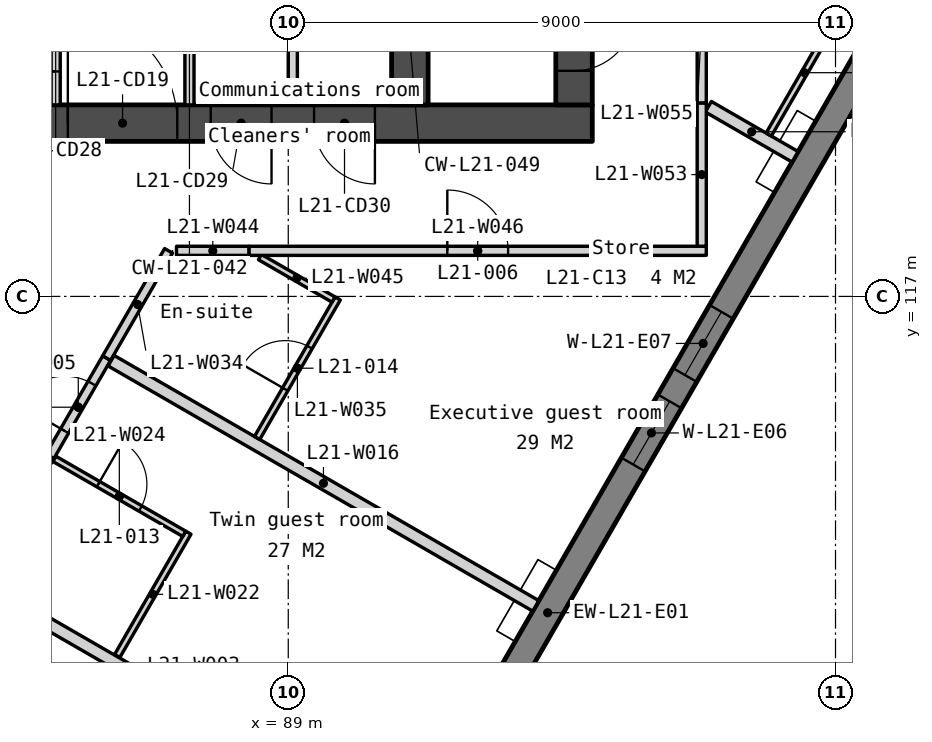
"""IFC4 building model, lengths in metres.
Left out: names, types, materials, properties, quantities, classifications, styles, units other than length and angle.
Written with IfcOpenShell. Run it as: python <this file> out.ifc"""

import sys

from ifc_helpers import new_model, si_unit, direction, frame, frame_2d, origin, place, context, subcontext, project, spatial, polyline, rectangle, outline, extrude, element, fill, save


model = new_model("IFC4")
c1 = context("Model", 3, precision=1e-05, world=origin(), true_north=direction((0.0, 1.0)))
c2 = subcontext(c1, "Body", "Model", "MODEL_VIEW")
j1 = project(units=[si_unit("LENGTHUNIT", "METRE"), si_unit("PLANEANGLEUNIT", "RADIAN")], contexts=[c1])
p1 = place(None, origin())
s1 = spatial("IfcSite", under=j1, at=p1, CompositionType="ELEMENT")
p2 = place(p1, origin())
s2 = spatial("IfcBuilding", under=s1, at=p2, CompositionType="ELEMENT")
p3 = place(p2, frame((0.0, 0.0, 88.8)))
s3 = spatial("IfcBuildingStorey", under=s2, at=p3, CompositionType="ELEMENT", Elevation=88.8)
p4 = place(p3, frame((66.0, 119.85, 0.0), z_axis=(0.0, 0.0, 1.0), x_axis=(1.0, 0.0, 0.0)))
e1 = element("IfcWall", 1, at=p4, inside=s3, PredefinedType="SOLIDWALL", context=c2, shape_type="SweptSolid", body=[
    extrude(rectangle(XDim=28.0, YDim=0.6, at=frame_2d((14.0, 0.0))), origin(), (0.0, 0.0, 1.0), 3.35),
])
p5 = place(p4, frame((6.825, 0.0, 0.0)))
e2 = element("IfcOpeningElement", 2, at=p5, cuts=e1, PredefinedType="OPENING", context=c2, shape_type="SweptSolid", body=[
    extrude(rectangle(XDim=1.8, YDim=2.1, at=frame_2d((0.9, 1.05))), frame((0.0, 0.31, 0.0), z_axis=(0.0, -1.0, 0.0), x_axis=(1.0, 0.0, 0.0)), (0.0, 0.0, 1.0), 0.62),
])
p6 = place(p4, frame((15.85, 0.0, 0.0)))
e3 = element("IfcOpeningElement", 3, at=p6, cuts=e1, PredefinedType="OPENING", context=c2, shape_type="SweptSolid", body=[
    extrude(rectangle(XDim=1.5, YDim=2.1, at=frame_2d((0.75, 1.05))), frame((0.0, 0.31, 0.0), z_axis=(0.0, -1.0, 0.0), x_axis=(1.0, 0.0, 0.0)), (0.0, 0.0, 1.0), 0.62),
])
p7 = place(p4, frame((19.375, 0.0, 0.0)))
e4 = element("IfcOpeningElement", 4, at=p7, cuts=e1, PredefinedType="OPENING", context=c2, shape_type="SweptSolid", body=[
    extrude(rectangle(XDim=1.8, YDim=2.1, at=frame_2d((0.9, 1.05))), frame((0.0, 0.31, 0.0), z_axis=(0.0, -1.0, 0.0), x_axis=(1.0, 0.0, 0.0)), (0.0, 0.0, 1.0), 0.62),
])
p8 = place(p4, frame((4.425, 0.0, 0.0)))
e5 = element("IfcOpeningElement", 5, at=p8, cuts=e1, PredefinedType="OPENING", context=c2, shape_type="SweptSolid", body=[
    extrude(rectangle(XDim=1.0, YDim=2.1, at=frame_2d((0.5, 1.05))), frame((0.0, 0.31, 0.0), z_axis=(0.0, -1.0, 0.0), x_axis=(1.0, 0.0, 0.0)), (0.0, 0.0, 1.0), 0.62),
])
p9 = place(p4, frame((9.783, 0.0, 0.0)))
e6 = element("IfcOpeningElement", 6, at=p9, cuts=e1, PredefinedType="OPENING", context=c2, shape_type="SweptSolid", body=[
    extrude(rectangle(XDim=1.0, YDim=2.1, at=frame_2d((0.5, 1.05))), frame((0.0, 0.31, 0.0), z_axis=(0.0, -1.0, 0.0), x_axis=(1.0, 0.0, 0.0)), (0.0, 0.0, 1.0), 0.62),
])
p10 = place(p4, frame((11.525, 0.0, 0.0)))
e7 = element("IfcOpeningElement", 7, at=p10, cuts=e1, PredefinedType="OPENING", context=c2, shape_type="SweptSolid", body=[
    extrude(rectangle(XDim=1.0, YDim=2.1, at=frame_2d((0.5, 1.05))), frame((0.0, 0.31, 0.0), z_axis=(0.0, -1.0, 0.0), x_axis=(1.0, 0.0, 0.0)), (0.0, 0.0, 1.0), 0.62),
])
p11 = place(p4, frame((13.658, 0.0, 0.0)))
e8 = element("IfcOpeningElement", 8, at=p11, cuts=e1, PredefinedType="OPENING", context=c2, shape_type="SweptSolid", body=[
    extrude(rectangle(XDim=1.0, YDim=2.1, at=frame_2d((0.5, 1.05))), frame((0.0, 0.31, 0.0), z_axis=(0.0, -1.0, 0.0), x_axis=(1.0, 0.0, 0.0)), (0.0, 0.0, 1.0), 0.62),
])
p12 = place(p4, frame((21.725, 0.0, 0.0)))
e9 = element("IfcOpeningElement", 9, at=p12, cuts=e1, PredefinedType="OPENING", context=c2, shape_type="SweptSolid", body=[
    extrude(rectangle(XDim=1.0, YDim=2.1, at=frame_2d((0.5, 1.05))), frame((0.0, 0.31, 0.0), z_axis=(0.0, -1.0, 0.0), x_axis=(1.0, 0.0, 0.0)), (0.0, 0.0, 1.0), 0.62),
])
p13 = place(p4, frame((23.425, 0.0, 0.0)))
e10 = element("IfcOpeningElement", 10, at=p13, cuts=e1, PredefinedType="OPENING", context=c2, shape_type="SweptSolid", body=[
    extrude(rectangle(XDim=1.0, YDim=2.1, at=frame_2d((0.5, 1.05))), frame((0.0, 0.31, 0.0), z_axis=(0.0, -1.0, 0.0), x_axis=(1.0, 0.0, 0.0)), (0.0, 0.0, 1.0), 0.62),
])
p14 = place(p3, frame((85.175, 122.25, 0.0), z_axis=(0.0, 0.0, 1.0), x_axis=(0.0, -1.0, 0.0)))
e11 = element("IfcWall", 11, at=p14, inside=s3, PredefinedType="PARTITIONING", context=c2, shape_type="SweptSolid", body=[
    extrude(rectangle(XDim=2.1, YDim=0.15, at=frame_2d((1.05, 0.0))), origin(), (0.0, 0.0, 1.0), 3.35),
])
p15 = place(p14, frame((0.55, 0.0, 0.0)))
e12 = element("IfcOpeningElement", 12, at=p15, cuts=e11, PredefinedType="OPENING", context=c2, shape_type="SweptSolid", body=[
    extrude(rectangle(XDim=1.0, YDim=2.1, at=frame_2d((0.5, 1.05))), frame((0.0, 0.085, 0.0), z_axis=(0.0, -1.0, 0.0), x_axis=(1.0, 0.0, 0.0)), (0.0, 0.0, 1.0), 0.17),
])
for number, where, z_axis, x_axis in (
    (13, (87.375, 122.25, 0.0), (0.0, 0.0, 1.0), (0.0, -1.0, 0.0)),
    (14, (89.075, 122.25, 0.0), (0.0, 0.0, 1.0), (0.0, -1.0, 0.0)),
):
    element("IfcWall", number, at=place(p3, frame(where, z_axis=z_axis, x_axis=x_axis)), inside=s3, PredefinedType="PARTITIONING", context=c2, shape_type="SweptSolid", body=[
        extrude(rectangle(XDim=2.1, YDim=0.15, at=frame_2d((1.05, 0.0))), origin(), (0.0, 0.0, 1.0), 3.35),
    ])
p16 = place(p3, frame((91.0, 122.25, 0.0), z_axis=(0.0, 0.0, 1.0), x_axis=(0.0, -1.0, 0.0)))
e15 = element("IfcWall", 15, at=p16, inside=s3, PredefinedType="SOLIDWALL", context=c2, shape_type="SweptSolid", body=[
    extrude(rectangle(XDim=2.1, YDim=0.6, at=frame_2d((1.05, 0.0))), origin(), (0.0, 0.0, 1.0), 3.35),
])
p17 = place(p3, frame((93.7, 133.95, 0.0), z_axis=(0.0, 0.0, 1.0), x_axis=(0.0, -1.0, 0.0)))
e16 = element("IfcWall", 16, at=p17, inside=s3, PredefinedType="SOLIDWALL", context=c2, shape_type="SweptSolid", body=[
    extrude(rectangle(XDim=13.8, YDim=0.6, at=frame_2d((6.9, 0.0))), origin(), (0.0, 0.0, 1.0), 3.35),
])
p18 = place(p17, frame((0.6, 0.0, 0.0)))
e17 = element("IfcOpeningElement", 17, at=p18, cuts=e16, PredefinedType="OPENING", context=c2, shape_type="SweptSolid", body=[
    extrude(rectangle(XDim=1.1, YDim=2.1, at=frame_2d((0.55, 1.05))), frame((0.0, 0.31, 0.0), z_axis=(0.0, -1.0, 0.0), x_axis=(1.0, 0.0, 0.0)), (0.0, 0.0, 1.0), 0.62),
])
p19 = place(p17, frame((10.064, 0.0, 0.0)))
e18 = element("IfcOpeningElement", 18, at=p19, cuts=e16, PredefinedType="OPENING", context=c2, shape_type="SweptSolid", body=[
    extrude(rectangle(XDim=1.0, YDim=2.1, at=frame_2d((0.5, 1.05))), frame((0.0, 0.31, 0.0), z_axis=(0.0, -1.0, 0.0), x_axis=(1.0, 0.0, 0.0)), (0.0, 0.0, 1.0), 0.62),
])
p20 = place(p17, frame((8.35, 0.0, 0.0)))
e19 = element("IfcOpeningElement", 19, at=p20, cuts=e16, PredefinedType="OPENING", context=c2, shape_type="SweptSolid", body=[
    extrude(rectangle(XDim=0.85, YDim=2.1, at=frame_2d((0.425, 1.05))), frame((0.0, 0.31, 0.0), z_axis=(0.0, -1.0, 0.0), x_axis=(1.0, 0.0, 0.0)), (0.0, 0.0, 1.0), 0.62),
])
p21 = place(p17, frame((12.239, 0.0, 0.0)))
e20 = element("IfcOpeningElement", 20, at=p21, cuts=e16, PredefinedType="OPENING", context=c2, shape_type="SweptSolid", body=[
    extrude(rectangle(XDim=1.0, YDim=2.1, at=frame_2d((0.5, 1.05))), frame((0.0, 0.31, 0.0), z_axis=(0.0, -1.0, 0.0), x_axis=(1.0, 0.0, 0.0)), (0.0, 0.0, 1.0), 0.62),
])
p22 = place(p3, frame((82.605, 93.333, -0.15), z_axis=(0.0, 0.0, 1.0), x_axis=(0.500000478905, 0.866025127289, 0.0)))
e21 = element("IfcWall", 21, at=p22, inside=s3, PredefinedType="SOLIDWALL", context=c2, shape_type="SweptSolid", body=[
    extrude(outline(polyline([(42.643, 0.0), (42.643, 3.5), (0.0, 3.5), (0.0, 0.0), (42.643, 0.0)])), frame((0.0, 0.225, 0.0), z_axis=(0.0, -1.0, 0.0), x_axis=(1.0, 0.0, 0.0)), (0.0, 0.0, 1.0), 0.45),
])
p23 = place(p22, frame((0.72, 0.0, 1.05)))
e22 = element("IfcOpeningElement", 22, at=p23, cuts=e21, PredefinedType="OPENING", context=c2, shape_type="SweptSolid", body=[
    extrude(rectangle(XDim=1.2, YDim=1.5, at=frame_2d((0.6, 0.75))), frame((0.0, 0.235, 0.0), z_axis=(0.0, -1.0, 0.0), x_axis=(1.0, 0.0, 0.0)), (0.0, 0.0, 1.0), 0.47),
])
p24 = place(p22, frame((7.079, 0.0, 1.05)))
e23 = element("IfcOpeningElement", 23, at=p24, cuts=e21, PredefinedType="OPENING", context=c2, shape_type="SweptSolid", body=[
    extrude(rectangle(XDim=1.2, YDim=1.5, at=frame_2d((0.6, 0.75))), frame((0.0, 0.235, 0.0), z_axis=(0.0, -1.0, 0.0), x_axis=(1.0, 0.0, 0.0)), (0.0, 0.0, 1.0), 0.47),
])
p25 = place(p22, frame((8.779, 0.0, 1.05)))
e24 = element("IfcOpeningElement", 24, at=p25, cuts=e21, PredefinedType="OPENING", context=c2, shape_type="SweptSolid", body=[
    extrude(rectangle(XDim=1.2, YDim=1.5, at=frame_2d((0.6, 0.75))), frame((0.0, 0.235, 0.0), z_axis=(0.0, -1.0, 0.0), x_axis=(1.0, 0.0, 0.0)), (0.0, 0.0, 1.0), 0.47),
])
p26 = place(p22, frame((15.607, 0.0, 1.05)))
e25 = element("IfcOpeningElement", 25, at=p26, cuts=e21, PredefinedType="OPENING", context=c2, shape_type="SweptSolid", body=[
    extrude(rectangle(XDim=1.2, YDim=1.5, at=frame_2d((0.6, 0.75))), frame((0.0, 0.235, 0.0), z_axis=(0.0, -1.0, 0.0), x_axis=(1.0, 0.0, 0.0)), (0.0, 0.0, 1.0), 0.47),
])
p27 = place(p22, frame((17.307, 0.0, 1.05)))
e26 = element("IfcOpeningElement", 26, at=p27, cuts=e21, PredefinedType="OPENING", context=c2, shape_type="SweptSolid", body=[
    extrude(rectangle(XDim=1.2, YDim=1.5, at=frame_2d((0.6, 0.75))), frame((0.0, 0.235, 0.0), z_axis=(0.0, -1.0, 0.0), x_axis=(1.0, 0.0, 0.0)), (0.0, 0.0, 1.0), 0.47),
])
p28 = place(p22, frame((24.136, 0.0, 1.05)))
e27 = element("IfcOpeningElement", 27, at=p28, cuts=e21, PredefinedType="OPENING", context=c2, shape_type="SweptSolid", body=[
    extrude(rectangle(XDim=1.2, YDim=1.5, at=frame_2d((0.6, 0.75))), frame((0.0, 0.235, 0.0), z_axis=(0.0, -1.0, 0.0), x_axis=(1.0, 0.0, 0.0)), (0.0, 0.0, 1.0), 0.47),
])
p29 = place(p22, frame((25.836, 0.0, 1.05)))
e28 = element("IfcOpeningElement", 28, at=p29, cuts=e21, PredefinedType="OPENING", context=c2, shape_type="SweptSolid", body=[
    extrude(rectangle(XDim=1.2, YDim=1.5, at=frame_2d((0.6, 0.75))), frame((0.0, 0.235, 0.0), z_axis=(0.0, -1.0, 0.0), x_axis=(1.0, 0.0, 0.0)), (0.0, 0.0, 1.0), 0.47),
])
p30 = place(p22, frame((32.665, 0.0, 1.05)))
e29 = element("IfcOpeningElement", 29, at=p30, cuts=e21, PredefinedType="OPENING", context=c2, shape_type="SweptSolid", body=[
    extrude(rectangle(XDim=1.2, YDim=1.5, at=frame_2d((0.6, 0.75))), frame((0.0, 0.235, 0.0), z_axis=(0.0, -1.0, 0.0), x_axis=(1.0, 0.0, 0.0)), (0.0, 0.0, 1.0), 0.47),
])
p31 = place(p22, frame((34.365, 0.0, 1.05)))
e30 = element("IfcOpeningElement", 30, at=p31, cuts=e21, PredefinedType="OPENING", context=c2, shape_type="SweptSolid", body=[
    extrude(rectangle(XDim=1.2, YDim=1.5, at=frame_2d((0.6, 0.75))), frame((0.0, 0.235, 0.0), z_axis=(0.0, -1.0, 0.0), x_axis=(1.0, 0.0, 0.0)), (0.0, 0.0, 1.0), 0.47),
])
p32 = place(p22, frame((40.722, 0.0, 1.05)))
e31 = element("IfcOpeningElement", 31, at=p32, cuts=e21, PredefinedType="OPENING", context=c2, shape_type="SweptSolid", body=[
    extrude(rectangle(XDim=1.2, YDim=1.5, at=frame_2d((0.6, 0.75))), frame((0.0, 0.235, 0.0), z_axis=(0.0, -1.0, 0.0), x_axis=(1.0, 0.0, 0.0)), (0.0, 0.0, 1.0), 0.47),
])
p33 = place(p3, frame((83.946, 112.255, 0.0), z_axis=(0.0, 0.0, 1.0), x_axis=(0.86603353517, -0.499985915763, 0.0)))
e32 = element("IfcWall", 32, at=p33, inside=s3, PredefinedType="PARTITIONING", context=c2, shape_type="SweptSolid", body=[
    extrude(rectangle(XDim=8.075, YDim=0.2, at=frame_2d((4.038, 0.0))), origin(), (0.0, 0.0, 1.0), 3.35),
])
p34 = place(p3, frame((86.087, 115.943, 0.0), z_axis=(0.0, 0.0, 1.0), x_axis=(0.866010152247, -0.500026415507, 0.0)))
e33 = element("IfcWall", 33, at=p34, inside=s3, PredefinedType="PARTITIONING", context=c2, shape_type="SweptSolid", body=[
    extrude(rectangle(XDim=8.065, YDim=0.2, at=frame_2d((4.032, 0.0))), origin(), (0.0, 0.0, 1.0), 3.35),
])
p35 = place(p3, frame((83.881, 112.292, 0.0), z_axis=(0.0, 0.0, 1.0), x_axis=(0.500001309137, 0.866024647952, 0.0)))
e34 = element("IfcWall", 34, at=p35, inside=s3, PredefinedType="PARTITIONING", context=c2, shape_type="SweptSolid", body=[
    extrude(rectangle(XDim=2.4, YDim=0.15, at=frame_2d((1.2, 0.0))), origin(), (0.0, 0.0, 1.0), 3.35),
])
p36 = place(p3, frame((86.188, 111.088, 0.0), z_axis=(0.0, 0.0, 1.0), x_axis=(0.499999433879, 0.866025730634, 0.0)))
e35 = element("IfcWall", 35, at=p36, inside=s3, PredefinedType="PARTITIONING", context=c2, shape_type="SweptSolid", body=[
    extrude(rectangle(XDim=2.34, YDim=0.1, at=frame_2d((1.17, 0.0))), origin(), (0.0, 0.0, 1.0), 3.35),
])
p37 = place(p3, frame((85.154, 114.328, 0.0), z_axis=(0.0, 0.0, 1.0), x_axis=(0.866040446274, -0.499973944738, 0.0)))
e36 = element("IfcWall", 36, at=p37, inside=s3, PredefinedType="PARTITIONING", context=c2, shape_type="SweptSolid", body=[
    extrude(rectangle(XDim=2.465, YDim=0.1, at=frame_2d((1.232, 0.0))), origin(), (0.0, 0.0, 1.0), 3.35),
])
p38 = place(p37, frame((0.833, 0.0, 0.0)))
e37 = element("IfcOpeningElement", 37, at=p38, cuts=e36, PredefinedType="OPENING", context=c2, shape_type="SweptSolid", body=[
    extrude(rectangle(XDim=0.8, YDim=2.1, at=frame_2d((0.4, 1.05))), frame((0.0, 0.06, 0.0), z_axis=(0.0, -1.0, 0.0), x_axis=(1.0, 0.0, 0.0)), (0.0, 0.0, 1.0), 0.12),
])
p39 = place(p3, frame((85.081, 114.371, 0.0), z_axis=(0.0, 0.0, 1.0), x_axis=(0.499941596792, 0.866059120267, 0.0)))
e38 = element("IfcWall", 38, at=p39, inside=s3, PredefinedType="PARTITIONING", context=c2, shape_type="SweptSolid", body=[
    extrude(rectangle(XDim=1.865, YDim=0.15, at=frame_2d((0.932, 0.0))), origin(), (0.0, 0.0, 1.0), 3.35),
])
p40 = place(p39, frame((0.482, 0.0, 0.0)))
e39 = element("IfcOpeningElement", 39, at=p40, cuts=e38, PredefinedType="OPENING", context=c2, shape_type="SweptSolid", body=[
    extrude(rectangle(XDim=0.9, YDim=2.1, at=frame_2d((0.45, 1.05))), frame((0.0, 0.085, 0.0), z_axis=(0.0, -1.0, 0.0), x_axis=(1.0, 0.0, 0.0)), (0.0, 0.0, 1.0), 0.17),
])
p41 = place(p3, frame((86.013, 115.985, 0.0), z_axis=(0.0, 0.0, 1.0), x_axis=(0.499992114976, 0.866029956157, 0.0)))
e40 = element("IfcWall", 40, at=p41, inside=s3, PredefinedType="PARTITIONING", context=c2, shape_type="SweptSolid", body=[
    extrude(rectangle(XDim=2.038, YDim=0.15, at=frame_2d((1.019, 0.0))), origin(), (0.0, 0.0, 1.0), 3.35),
])
p42 = place(p3, frame((88.488, 114.672, 0.0), z_axis=(0.0, 0.0, 1.0), x_axis=(0.499993606316, 0.866029095148, 0.0)))
e41 = element("IfcWall", 41, at=p42, inside=s3, PredefinedType="PARTITIONING", context=c2, shape_type="SweptSolid", body=[
    extrude(rectangle(XDim=2.65, YDim=0.1, at=frame_2d((1.325, 0.0))), origin(), (0.0, 0.0, 1.0), 3.35),
])
p43 = place(p42, frame((0.925, 0.0, 0.0)))
e42 = element("IfcOpeningElement", 42, at=p43, cuts=e41, PredefinedType="OPENING", context=c2, shape_type="SweptSolid", body=[
    extrude(rectangle(XDim=0.8, YDim=2.1, at=frame_2d((0.4, 1.05))), frame((0.0, 0.06, 0.0), z_axis=(0.0, -1.0, 0.0), x_axis=(1.0, 0.0, 0.0)), (0.0, 0.0, 1.0), 0.12),
])
p44 = place(p3, frame((87.162, 117.75, 0.0), z_axis=(0.0, 0.0, 1.0), x_axis=(1.0, 0.0, 0.0)))
e43 = element("IfcWall", 43, at=p44, inside=s3, PredefinedType="PARTITIONING", context=c2, shape_type="SweptSolid", body=[
    extrude(rectangle(XDim=1.195, YDim=0.15, at=frame_2d((0.597, 0.0))), origin(), (0.0, 0.0, 1.0), 3.35),
])
p45 = place(p3, frame((88.534, 117.647, 0.0), z_axis=(0.0, 0.0, 1.0), x_axis=(0.866031452229, -0.49998952364, 0.0)))
e44 = element("IfcWall", 44, at=p45, inside=s3, PredefinedType="PARTITIONING", context=c2, shape_type="SweptSolid", body=[
    extrude(rectangle(XDim=1.398, YDim=0.1, at=frame_2d((0.699, 0.0))), origin(), (0.0, 0.0, 1.0), 3.35),
])
p46 = place(p3, frame((88.356, 117.75, 0.0), z_axis=(0.0, 0.0, 1.0), x_axis=(1.0, 0.0, 0.0)))
e45 = element("IfcWall", 45, at=p46, inside=s3, PredefinedType="PARTITIONING", context=c2, shape_type="SweptSolid", body=[
    extrude(rectangle(XDim=7.519, YDim=0.15, at=frame_2d((3.759, 0.0))), origin(), (0.0, 0.0, 1.0), 3.35),
])
p47 = place(p46, frame((3.259, 0.0, 0.0)))
e46 = element("IfcOpeningElement", 46, at=p47, cuts=e45, PredefinedType="OPENING", context=c2, shape_type="SweptSolid", body=[
    extrude(rectangle(XDim=1.0, YDim=2.1, at=frame_2d((0.5, 1.05))), frame((0.0, 0.085, 0.0), z_axis=(0.0, -1.0, 0.0), x_axis=(1.0, 0.0, 0.0)), (0.0, 0.0, 1.0), 0.17),
])
p48 = place(p3, frame((95.908, 120.12, 0.0), z_axis=(0.0, 0.0, 1.0), x_axis=(0.866101713734, -0.499867803992, 0.0)))
e47 = element("IfcWall", 47, at=p48, inside=s3, PredefinedType="PARTITIONING", context=c2, shape_type="SweptSolid", body=[
    extrude(rectangle(XDim=1.648, YDim=0.2, at=frame_2d((0.824, 0.0))), origin(), (0.0, 0.0, 1.0), 3.35),
])
p49 = place(p3, frame((95.8, 117.825, 0.0), z_axis=(0.0, 0.0, 1.0), x_axis=(0.0, 1.0, 0.0)))
e48 = element("IfcWall", 48, at=p49, inside=s3, PredefinedType="PARTITIONING", context=c2, shape_type="SweptSolid", body=[
    extrude(rectangle(XDim=2.358, YDim=0.15, at=frame_2d((1.179, 0.0))), origin(), (0.0, 0.0, 1.0), 3.35),
])
p50 = place(p3, frame((95.8, 120.183, 0.0), z_axis=(0.0, 0.0, 1.0), x_axis=(0.0, 1.0, 0.0)))
e49 = element("IfcWall", 49, at=p50, inside=s3, PredefinedType="PARTITIONING", context=c2, shape_type="SweptSolid", body=[
    extrude(rectangle(XDim=2.771, YDim=0.15, at=frame_2d((1.386, 0.0))), origin(), (0.0, 0.0, 1.0), 3.35),
])
p51 = place(p3, frame((96.902, 119.662, 0.0), z_axis=(0.0, 0.0, 1.0), x_axis=(0.500016218704, 0.866016039709, 0.0)))
e50 = element("IfcWall", 50, at=p51, inside=s3, PredefinedType="PARTITIONING", context=c2, shape_type="SweptSolid", body=[
    extrude(rectangle(XDim=2.35, YDim=0.1, at=frame_2d((1.175, 0.0))), origin(), (0.0, 0.0, 1.0), 3.35),
])
p52 = place(p21, origin())
e51 = element("IfcDoor", 51, at=p52, inside=s3, OperationType="SINGLE_SWING_LEFT", PredefinedType="DOOR", context=c2, shape_type="SweptSolid", body=[
    extrude(rectangle(XDim=1.0, YDim=2.1, at=frame_2d((0.5, 1.05))), frame((0.0, 0.025, 0.0), z_axis=(0.0, -1.0, 0.0), x_axis=(1.0, 0.0, 0.0)), (0.0, 0.0, 1.0), 0.05),
])
fill(e20, e51)
p53 = place(p7, origin())
e52 = element("IfcDoor", 52, at=p53, inside=s3, OperationType="DOUBLE_DOOR_DOUBLE_SWING", PredefinedType="DOOR", context=c2, shape_type="SweptSolid", body=[
    extrude(rectangle(XDim=1.8, YDim=2.1, at=frame_2d((0.9, 1.05))), frame((0.0, 0.025, 0.0), z_axis=(0.0, -1.0, 0.0), x_axis=(1.0, 0.0, 0.0)), (0.0, 0.0, 1.0), 0.05),
])
fill(e4, e52)
p54 = place(p15, origin())
e53 = element("IfcDoor", 53, at=p54, inside=s3, OperationType="SINGLE_SWING_RIGHT", PredefinedType="DOOR", context=c2, shape_type="SweptSolid", body=[
    extrude(rectangle(XDim=1.0, YDim=2.1, at=frame_2d((0.5, 1.05))), frame((0.0, 0.025, 0.0), z_axis=(0.0, -1.0, 0.0), x_axis=(1.0, 0.0, 0.0)), (0.0, 0.0, 1.0), 0.05),
])
fill(e12, e53)
p55 = place(p12, origin())
e54 = element("IfcDoor", 54, at=p55, inside=s3, OperationType="SINGLE_SWING_RIGHT", PredefinedType="DOOR", context=c2, shape_type="SweptSolid", body=[
    extrude(rectangle(XDim=1.0, YDim=2.1, at=frame_2d((0.5, 1.05))), frame((0.0, 0.025, 0.0), z_axis=(0.0, -1.0, 0.0), x_axis=(1.0, 0.0, 0.0)), (0.0, 0.0, 1.0), 0.05),
])
fill(e9, e54)
p56 = place(p13, origin())
e55 = element("IfcDoor", 55, at=p56, inside=s3, OperationType="SINGLE_SWING_RIGHT", PredefinedType="DOOR", context=c2, shape_type="SweptSolid", body=[
    extrude(rectangle(XDim=1.0, YDim=2.1, at=frame_2d((0.5, 1.05))), frame((0.0, 0.025, 0.0), z_axis=(0.0, -1.0, 0.0), x_axis=(1.0, 0.0, 0.0)), (0.0, 0.0, 1.0), 0.05),
])
fill(e10, e55)
p57 = place(p28, origin())
e56 = element("IfcWindow", 56, at=p57, inside=s3, PartitioningType="SINGLE_PANEL", PredefinedType="WINDOW", context=c2, shape_type="SweptSolid", body=[
    extrude(rectangle(XDim=1.2, YDim=1.5, at=frame_2d((0.6, 0.75))), frame((0.0, 0.03, 0.0), z_axis=(0.0, -1.0, 0.0), x_axis=(1.0, 0.0, 0.0)), (0.0, 0.0, 1.0), 0.06),
])
fill(e27, e56)
p58 = place(p29, origin())
e57 = element("IfcWindow", 57, at=p58, inside=s3, PartitioningType="SINGLE_PANEL", PredefinedType="WINDOW", context=c2, shape_type="SweptSolid", body=[
    extrude(rectangle(XDim=1.2, YDim=1.5, at=frame_2d((0.6, 0.75))), frame((0.0, 0.03, 0.0), z_axis=(0.0, -1.0, 0.0), x_axis=(1.0, 0.0, 0.0)), (0.0, 0.0, 1.0), 0.06),
])
fill(e28, e57)
p59 = place(p40, origin())
e58 = element("IfcDoor", 58, at=p59, inside=s3, OperationType="SINGLE_SWING_LEFT", PredefinedType="DOOR", context=c2, shape_type="SweptSolid", body=[
    extrude(rectangle(XDim=0.9, YDim=2.1, at=frame_2d((0.45, 1.05))), frame((0.0, 0.025, 0.0), z_axis=(0.0, -1.0, 0.0), x_axis=(1.0, 0.0, 0.0)), (0.0, 0.0, 1.0), 0.05),
])
fill(e39, e58)
p60 = place(p47, origin())
e59 = element("IfcDoor", 59, at=p60, inside=s3, OperationType="SINGLE_SWING_LEFT", PredefinedType="DOOR", context=c2, shape_type="SweptSolid", body=[
    extrude(rectangle(XDim=1.0, YDim=2.1, at=frame_2d((0.5, 1.05))), frame((0.0, 0.025, 0.0), z_axis=(0.0, -1.0, 0.0), x_axis=(1.0, 0.0, 0.0)), (0.0, 0.0, 1.0), 0.05),
])
fill(e46, e59)
p61 = place(p38, origin())
e60 = element("IfcDoor", 60, at=p61, inside=s3, OperationType="SINGLE_SWING_LEFT", PredefinedType="DOOR", context=c2, shape_type="SweptSolid", body=[
    extrude(rectangle(XDim=0.8, YDim=2.1, at=frame_2d((0.4, 1.05))), frame((0.0, 0.025, 0.0), z_axis=(0.0, -1.0, 0.0), x_axis=(1.0, 0.0, 0.0)), (0.0, 0.0, 1.0), 0.05),
])
fill(e37, e60)
p62 = place(p43, origin())
e61 = element("IfcDoor", 61, at=p62, inside=s3, OperationType="SINGLE_SWING_LEFT", PredefinedType="DOOR", context=c2, shape_type="SweptSolid", body=[
    extrude(rectangle(XDim=0.8, YDim=2.1, at=frame_2d((0.4, 1.05))), frame((0.0, 0.025, 0.0), z_axis=(0.0, -1.0, 0.0), x_axis=(1.0, 0.0, 0.0)), (0.0, 0.0, 1.0), 0.05),
])
fill(e42, e61)
save(model, sys.argv[1])
